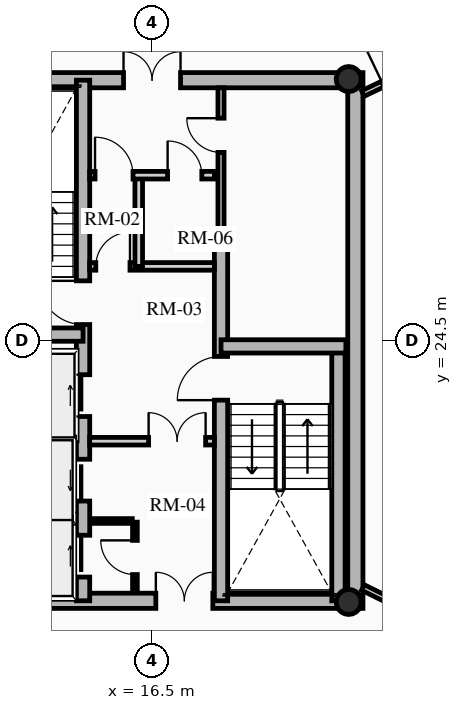
"""IFC4 building model, lengths in metres.
Left out: names, types, materials, properties, quantities, classifications, styles, units other than length and angle.
Written with IfcOpenShell. Run it as: python <this file> out.ifc"""

import sys

from ifc_helpers import new_model, si_unit, direction, frame, frame_2d, origin, origin_2d, place, context, subcontext, project, spatial, rectangle, hollow_circle, extrude, source, transform, mapped, element, fill, save


model = new_model("IFC4")
c1 = context("Model", 3, precision=1e-05, world=origin(), true_north=direction((0.0, 1.0)))
c2 = subcontext(c1, "Body", "Model", "MODEL_VIEW")
j1 = project(units=[si_unit("LENGTHUNIT", "METRE"), si_unit("PLANEANGLEUNIT", "RADIAN")], contexts=[c1])
p1 = place(None, origin())
s1 = spatial("IfcSite", under=j1, at=p1, CompositionType="ELEMENT")
p2 = place(p1, origin())
s2 = spatial("IfcBuilding", under=s1, at=p2, CompositionType="ELEMENT")
p3 = place(p2, frame((0.0, 0.0, 199.57)))
s3 = spatial("IfcBuildingStorey", under=s2, at=p3, CompositionType="ELEMENT", Elevation=199.57)
p4 = place(p3, frame((21.85, 17.45, 0.0), z_axis=(0.0, 0.0, 1.0), x_axis=(0.0, 1.0, 0.0)))
e1 = element("IfcWall", 1, at=p4, inside=s3, PredefinedType="SHEAR", context=c2, shape_type="SweptSolid", body=[
    extrude(rectangle(XDim=14.1, YDim=0.4, at=frame_2d((7.05, 0.0))), origin(), (0.0, 0.0, 1.0), 2.91),
])
p5 = place(p3, frame((11.15, 17.65, 0.0), z_axis=(0.0, 0.0, 1.0), x_axis=(1.0, 0.0, 0.0)))
e2 = element("IfcWall", 2, at=p5, inside=s3, PredefinedType="SHEAR", context=c2, shape_type="SweptSolid", body=[
    extrude(rectangle(XDim=10.7, YDim=0.4, at=frame_2d((5.35, 0.0))), origin(), (0.0, 0.0, 1.0), 2.91),
])
m1 = source(origin(), c2, "Body", "SweptSolid", [
    extrude(rectangle(XDim=1.5, YDim=2.02, at=frame_2d((0.75, 1.01))), frame((0.0, 0.21, 0.0), z_axis=(0.0, -1.0, 0.0), x_axis=(1.0, 0.0, 0.0)), (0.0, 0.0, 1.0), 0.42),
])
p6 = place(p5, frame((5.45, 0.0, 0.0)))
e3 = element("IfcOpeningElement", 3, at=p6, cuts=e2, PredefinedType="OPENING", context=c2, shape_type="MappedRepresentation", body=[
    mapped(m1, transform((0.0, 0.0, 0.0), x_axis=(1.0, 0.0, 0.0), y_axis=(0.0, 1.0, 0.0), z_axis=(0.0, 0.0, 1.0), scale=1.0)),
])
p7 = place(p3, frame((11.15, 31.35, 0.0), z_axis=(0.0, 0.0, 1.0), x_axis=(1.0, 0.0, 0.0)))
e4 = element("IfcWall", 4, at=p7, inside=s3, PredefinedType="SHEAR", context=c2, shape_type="SweptSolid", body=[
    extrude(rectangle(XDim=10.7, YDim=0.4, at=frame_2d((5.35, 0.0))), origin(), (0.0, 0.0, 1.0), 2.91),
])
p8 = place(p7, frame((4.6, 0.0, 0.0)))
e5 = element("IfcOpeningElement", 5, at=p8, cuts=e4, PredefinedType="OPENING", context=c2, shape_type="MappedRepresentation", body=[
    mapped(m1, transform((0.0, 0.0, 0.0), x_axis=(1.0, 0.0, 0.0), y_axis=(0.0, 1.0, 0.0), z_axis=(0.0, 0.0, 1.0), scale=1.0)),
])
p9 = place(p3, frame((14.685, 17.65, 0.0), z_axis=(0.0, 0.0, 1.0), x_axis=(0.0, 1.0, 0.0)))
e6 = element("IfcWall", 6, at=p9, inside=s3, PredefinedType="SHEAR", context=c2, shape_type="SweptSolid", body=[
    extrude(rectangle(XDim=13.7, YDim=0.35, at=frame_2d((6.85, 0.0))), origin(), (0.0, 0.0, 1.0), 2.91),
])
m2 = source(origin(), c2, "Body", "SweptSolid", [
    extrude(rectangle(XDim=1.1, YDim=2.015, at=frame_2d((0.55, 1.007))), frame((0.0, 0.185, 0.0), z_axis=(0.0, -1.0, 0.0), x_axis=(1.0, 0.0, 0.0)), (0.0, 0.0, 1.0), 0.37),
])
p10 = place(p9, frame((4.85, 0.0, 0.0)))
e7 = element("IfcOpeningElement", 7, at=p10, cuts=e6, PredefinedType="OPENING", context=c2, shape_type="MappedRepresentation", body=[
    mapped(m2, transform((0.0, 0.0, 0.0), x_axis=(1.0, 0.0, 0.0), y_axis=(0.0, 1.0, 0.0), z_axis=(0.0, 0.0, 1.0), scale=1.0)),
])
p11 = place(p9, frame((0.625, 0.0, 0.0)))
e8 = element("IfcOpeningElement", 8, at=p11, cuts=e6, PredefinedType="OPENING", context=c2, shape_type="MappedRepresentation", body=[
    mapped(m2, transform((0.0, 0.0, 0.0), x_axis=(1.0, 0.0, 0.0), y_axis=(0.0, 1.0, 0.0), z_axis=(0.0, 0.0, 1.0), scale=1.0)),
])
p12 = place(p9, frame((2.625, 0.0, 0.0)))
e9 = element("IfcOpeningElement", 9, at=p12, cuts=e6, PredefinedType="OPENING", context=c2, shape_type="MappedRepresentation", body=[
    mapped(m2, transform((0.0, 0.0, 0.0), x_axis=(1.0, 0.0, 0.0), y_axis=(0.0, 1.0, 0.0), z_axis=(0.0, 0.0, 1.0), scale=1.0)),
])
m3 = source(origin(), c2, "Body", "SweptSolid", [
    extrude(rectangle(XDim=1.15, YDim=2.02, at=frame_2d((0.575, 1.01))), frame((0.0, 0.185, 0.0), z_axis=(0.0, -1.0, 0.0), x_axis=(1.0, 0.0, 0.0)), (0.0, 0.0, 1.0), 0.37),
])
p13 = place(p9, frame((7.27, 0.0, 0.0)))
e10 = element("IfcOpeningElement", 10, at=p13, cuts=e6, PredefinedType="OPENING", context=c2, shape_type="MappedRepresentation", body=[
    mapped(m3, transform((0.0, 0.0, 0.0), x_axis=(1.0, 0.0, 0.0), y_axis=(0.0, 1.0, 0.0), z_axis=(0.0, 0.0, 1.0), scale=1.0)),
])
p14 = place(p3, frame((18.315, 17.65, 0.0), z_axis=(0.0, 0.0, 1.0), x_axis=(0.0, 1.0, 0.0)))
e11 = element("IfcWall", 11, at=p14, inside=s3, PredefinedType="SHEAR", context=c2, shape_type="SweptSolid", body=[
    extrude(rectangle(XDim=9.6, YDim=0.35, at=frame_2d((4.8, 0.0))), origin(), (0.0, 0.0, 1.0), 2.91),
])
p15 = place(p14, frame((5.28, 0.0, 0.0)))
e12 = element("IfcOpeningElement", 12, at=p15, cuts=e11, PredefinedType="OPENING", context=c2, shape_type="MappedRepresentation", body=[
    mapped(m3, transform((0.0, 0.0, 0.0), x_axis=(1.0, 0.0, 0.0), y_axis=(0.0, 1.0, 0.0), z_axis=(0.0, 0.0, 1.0), scale=1.0)),
])
p16 = place(p3, frame((11.4, 24.655, 0.0), z_axis=(0.0, 0.0, 1.0), x_axis=(1.0, 0.0, 0.0)))
e13 = element("IfcWall", 13, at=p16, inside=s3, PredefinedType="SHEAR", context=c2, shape_type="SweptSolid", body=[
    extrude(rectangle(XDim=3.285, YDim=0.35, at=frame_2d((1.643, 0.0))), origin(), (0.0, 0.0, 1.0), 2.91),
])
p17 = place(p3, frame((21.405, 17.65, 0.0), z_axis=(0.0, 0.0, 1.0), x_axis=(0.0, 1.0, 0.0)))
e14 = element("IfcWall", 14, at=p17, inside=s3, PredefinedType="SHEAR", context=c2, shape_type="SweptSolid", body=[
    extrude(rectangle(XDim=6.695, YDim=0.35, at=frame_2d((3.348, 0.0))), origin(), (0.0, 0.0, 1.0), 2.91),
])
p18 = place(p3, frame((18.315, 24.345, 0.0), z_axis=(0.0, 0.0, 1.0), x_axis=(1.0, 0.0, 0.0)))
e15 = element("IfcWall", 15, at=p18, inside=s3, PredefinedType="SHEAR", context=c2, shape_type="SweptSolid", body=[
    extrude(rectangle(XDim=3.285, YDim=0.35, at=frame_2d((1.643, 0.0))), origin(), (0.0, 0.0, 1.0), 2.91),
])
for number, where, z_axis, x_axis in (
    (16, (21.675, 17.62, 0.0), (0.0, 0.0, 1.0), (1.0, 0.0, 0.0)),
    (17, (21.675, 31.38, 0.0), (0.0, 0.0, 1.0), (1.0, 0.0, 0.0)),
):
    element("IfcColumn", number, at=place(p3, frame(where, z_axis=z_axis, x_axis=x_axis)), inside=s3, PredefinedType="COLUMN", context=c2, shape_type="SweptSolid", body=[
        extrude(hollow_circle(Radius=0.33, WallThickness=0.025, at=origin_2d()), origin(), (0.0, 0.0, 1.0), 2.91),
    ])
for number, where, z_axis, x_axis in (
    (18, (11.52, 21.8, 0.0), (0.0, 0.0, 1.0), (1.0, 0.0, 0.0)),
    (19, (11.52, 19.825, 0.0), (0.0, 0.0, 1.0), (1.0, 0.0, 0.0)),
):
    element("IfcWall", number, at=place(p3, frame(where, z_axis=z_axis, x_axis=x_axis)), inside=s3, PredefinedType="SHEAR", context=c2, shape_type="SweptSolid", body=[
        extrude(rectangle(XDim=2.97, YDim=0.2, at=frame_2d((1.485, 0.0))), origin(), (0.0, 0.0, 1.0), 2.91),
    ])
p19 = place(p3, frame((14.86, 21.85, 0.0), z_axis=(0.0, 0.0, 1.0), x_axis=(1.0, 0.0, 0.0)))
e20 = element("IfcWall", 20, at=p19, inside=s3, PredefinedType="PARTITIONING", context=c2, shape_type="SweptSolid", body=[
    extrude(rectangle(XDim=3.28, YDim=0.2, at=frame_2d((1.64, 0.0))), origin(), (0.0, 0.0, 1.0), 2.685),
])
m4 = source(origin(), c2, "Body", "SweptSolid", [
    extrude(rectangle(XDim=1.5, YDim=2.02, at=frame_2d((0.75, 1.01))), frame((0.0, 0.11, 0.0), z_axis=(0.0, -1.0, 0.0), x_axis=(1.0, 0.0, 0.0)), (0.0, 0.0, 1.0), 0.22),
])
p20 = place(p19, frame((1.55, 0.0, 0.0)))
e21 = element("IfcOpeningElement", 21, at=p20, cuts=e20, PredefinedType="OPENING", context=c2, shape_type="MappedRepresentation", body=[
    mapped(m4, transform((0.0, 0.0, 0.0), x_axis=(1.0, 0.0, 0.0), y_axis=(0.0, 1.0, 0.0), z_axis=(0.0, 0.0, 1.0), scale=1.0)),
])
p21 = place(p3, frame((14.86, 26.45, 0.0), z_axis=(0.0, 0.0, 1.0), x_axis=(1.0, 0.0, 0.0)))
e22 = element("IfcWall", 22, at=p21, inside=s3, PredefinedType="PARTITIONING", context=c2, shape_type="SweptSolid", body=[
    extrude(rectangle(XDim=3.28, YDim=0.2, at=frame_2d((1.64, 0.0))), origin(), (0.0, 0.0, 1.0), 2.685),
])
m5 = source(origin(), c2, "Body", "SweptSolid", [
    extrude(rectangle(XDim=0.9, YDim=2.005, at=frame_2d((0.45, 1.002))), frame((0.0, 0.11, 0.0), z_axis=(0.0, -1.0, 0.0), x_axis=(1.0, 0.0, 0.0)), (0.0, 0.0, 1.0), 0.22),
])
p22 = place(p21, frame((0.16, 0.0, 0.0)))
e23 = element("IfcOpeningElement", 23, at=p22, cuts=e22, PredefinedType="OPENING", context=c2, shape_type="MappedRepresentation", body=[
    mapped(m5, transform((0.0, 0.0, 0.0), x_axis=(1.0, 0.0, 0.0), y_axis=(0.0, 1.0, 0.0), z_axis=(0.0, 0.0, 1.0), scale=1.0)),
])
p23 = place(p3, frame((16.15, 26.45, 0.0), z_axis=(0.0, 0.0, 1.0), x_axis=(0.0, 1.0, 0.0)))
e24 = element("IfcWall", 24, at=p23, inside=s3, PredefinedType="PARTITIONING", context=c2, shape_type="SweptSolid", body=[
    extrude(rectangle(XDim=2.4, YDim=0.2, at=frame_2d((1.2, 0.0))), origin(), (0.0, 0.0, 1.0), 2.685),
])
p24 = place(p3, frame((14.86, 28.85, 0.0), z_axis=(0.0, 0.0, 1.0), x_axis=(1.0, 0.0, 0.0)))
e25 = element("IfcWall", 25, at=p24, inside=s3, PredefinedType="PARTITIONING", context=c2, shape_type="SweptSolid", body=[
    extrude(rectangle(XDim=3.28, YDim=0.2, at=frame_2d((1.64, 0.0))), origin(), (0.0, 0.0, 1.0), 2.685),
])
m6 = source(origin(), c2, "Body", "SweptSolid", [
    extrude(rectangle(XDim=1.0, YDim=2.015, at=frame_2d((0.5, 1.007))), frame((0.0, 0.11, 0.0), z_axis=(0.0, -1.0, 0.0), x_axis=(1.0, 0.0, 0.0)), (0.0, 0.0, 1.0), 0.22),
])
p25 = place(p24, frame((0.14, 0.0, 0.0)))
e26 = element("IfcOpeningElement", 26, at=p25, cuts=e25, PredefinedType="OPENING", context=c2, shape_type="MappedRepresentation", body=[
    mapped(m6, transform((0.0, 0.0, 0.0), x_axis=(1.0, 0.0, 0.0), y_axis=(0.0, 1.0, 0.0), z_axis=(0.0, 0.0, 1.0), scale=1.0)),
])
p26 = place(p24, frame((2.05, 0.0, 0.0)))
e27 = element("IfcOpeningElement", 27, at=p26, cuts=e25, PredefinedType="OPENING", context=c2, shape_type="MappedRepresentation", body=[
    mapped(m5, transform((0.0, 0.0, 0.0), x_axis=(1.0, 0.0, 0.0), y_axis=(0.0, 1.0, 0.0), z_axis=(0.0, 0.0, 1.0), scale=1.0)),
])
p27 = place(p3, frame((16.05, 17.92, 0.0), z_axis=(0.0, 0.0, 1.0), x_axis=(0.0, 1.0, 0.0)))
e28 = element("IfcWall", 28, at=p27, inside=s3, PredefinedType="PARTITIONING", context=c2, shape_type="SweptSolid", body=[
    extrude(rectangle(XDim=1.8, YDim=0.125, at=frame_2d((0.9, 0.0))), origin(), (0.0, 0.0, 1.0), 2.685),
])
m7 = source(origin(), c2, "Body", "SweptSolid", [
    extrude(rectangle(XDim=0.9, YDim=2.005, at=frame_2d((0.45, 1.002))), frame((0.0, 0.073, 0.0), z_axis=(0.0, -1.0, 0.0), x_axis=(1.0, 0.0, 0.0)), (0.0, 0.0, 1.0), 0.145),
])
p28 = place(p27, frame((0.42, 0.0, 0.0)))
e29 = element("IfcOpeningElement", 29, at=p28, cuts=e28, PredefinedType="OPENING", context=c2, shape_type="MappedRepresentation", body=[
    mapped(m7, transform((0.0, 0.0, 0.0), x_axis=(1.0, 0.0, 0.0), y_axis=(0.0, 1.0, 0.0), z_axis=(0.0, 0.0, 1.0), scale=1.0)),
])
p29 = place(p3, frame((14.88, 19.75, 0.0), z_axis=(0.0, 0.0, 1.0), x_axis=(1.0, 0.0, 0.0)))
e30 = element("IfcWall", 30, at=p29, inside=s3, PredefinedType="PARTITIONING", context=c2, shape_type="SweptSolid", body=[
    extrude(rectangle(XDim=1.1, YDim=0.125, at=frame_2d((0.55, 0.0))), origin(), (0.0, 0.0, 1.0), 2.685),
])
p30 = place(p3, frame((18.315, 27.25, 0.0), z_axis=(0.0, 0.0, 1.0), x_axis=(0.0, 1.0, 0.0)))
e31 = element("IfcWall", 31, at=p30, inside=s3, PredefinedType="PARTITIONING", context=c2, shape_type="SweptSolid", body=[
    extrude(rectangle(XDim=3.9, YDim=0.16, at=frame_2d((1.95, 0.0))), origin(), (0.0, 0.0, 1.0), 2.685),
])
m8 = source(origin(), c2, "Body", "SweptSolid", [
    extrude(rectangle(XDim=0.9, YDim=2.005, at=frame_2d((0.45, 1.002))), frame((0.0, 0.09, 0.0), z_axis=(0.0, -1.0, 0.0), x_axis=(1.0, 0.0, 0.0)), (0.0, 0.0, 1.0), 0.18),
])
p31 = place(p30, frame((2.2, 0.0, 0.0)))
e32 = element("IfcOpeningElement", 32, at=p31, cuts=e31, PredefinedType="OPENING", context=c2, shape_type="MappedRepresentation", body=[
    mapped(m8, transform((0.0, 0.0, 0.0), x_axis=(1.0, 0.0, 0.0), y_axis=(0.0, 1.0, 0.0), z_axis=(0.0, 0.0, 1.0), scale=1.0)),
])
p32 = place(p3, frame((22.05, 31.0, 0.0), z_axis=(0.0, 0.0, 1.0), x_axis=(0.903013459407, 0.429612257891, 0.0)))
e33 = element("IfcWall", 33, at=p32, inside=s3, PredefinedType="PARTITIONING", context=c2, shape_type="SweptSolid", body=[
    extrude(rectangle(XDim=1.829, YDim=0.16, at=frame_2d((0.914, 0.0))), origin(), (0.0, 0.0, 1.0), 2.255),
])
m9 = source(origin(), c2, "Body", "SweptSolid", [
    extrude(rectangle(XDim=1.05, YDim=2.015, at=frame_2d((0.525, 1.007))), frame((0.0, 0.09, 0.0), z_axis=(0.0, -1.0, 0.0), x_axis=(1.0, 0.0, 0.0)), (0.0, 0.0, 1.0), 0.18),
])
p33 = place(p32, frame((0.579, 0.0, 0.0)))
e34 = element("IfcOpeningElement", 34, at=p33, cuts=e33, PredefinedType="OPENING", context=c2, shape_type="MappedRepresentation", body=[
    mapped(m9, transform((0.0, 0.0, 0.0), x_axis=(1.0, 0.0, 0.0), y_axis=(0.0, 1.0, 0.0), z_axis=(0.0, 0.0, 1.0), scale=1.0)),
])
p34 = place(p3, frame((22.05, 18.0, 0.0), z_axis=(0.0, 0.0, 1.0), x_axis=(0.896045848613, -0.443961526692, 0.0)))
e35 = element("IfcWall", 35, at=p34, inside=s3, PredefinedType="PARTITIONING", context=c2, shape_type="SweptSolid", body=[
    extrude(rectangle(XDim=1.924, YDim=0.16, at=frame_2d((0.962, 0.0))), origin(), (0.0, 0.0, 1.0), 2.255),
])
p35 = place(p34, frame((0.674, 0.0, 0.0)))
e36 = element("IfcOpeningElement", 36, at=p35, cuts=e35, PredefinedType="OPENING", context=c2, shape_type="MappedRepresentation", body=[
    mapped(m9, transform((0.0, 0.0, 0.0), x_axis=(1.0, 0.0, 0.0), y_axis=(0.0, 1.0, 0.0), z_axis=(0.0, 0.0, 1.0), scale=1.0)),
])
m10 = source(origin(), c2, "Body", "SweptSolid", [
    extrude(rectangle(XDim=1.1, YDim=2.015, at=frame_2d((0.55, 1.007))), frame((0.0, 0.025, 0.0), z_axis=(0.0, -1.0, 0.0), x_axis=(1.0, 0.0, 0.0)), (0.0, 0.0, 1.0), 0.05),
])
p36 = place(p10, origin())
e37 = element("IfcDoor", 37, at=p36, inside=s3, OperationType="SLIDING_TO_RIGHT", PredefinedType="DOOR", context=c2, shape_type="MappedRepresentation", body=[
    mapped(m10, transform((0.0, 0.0, 0.0), x_axis=(1.0, 0.0, 0.0), y_axis=(0.0, 1.0, 0.0), z_axis=(0.0, 0.0, 1.0), scale=1.0)),
])
fill(e7, e37)
p37 = place(p11, origin())
e38 = element("IfcDoor", 38, at=p37, inside=s3, OperationType="SLIDING_TO_RIGHT", PredefinedType="DOOR", context=c2, shape_type="MappedRepresentation", body=[
    mapped(m10, transform((0.0, 0.0, 0.0), x_axis=(1.0, 0.0, 0.0), y_axis=(0.0, 1.0, 0.0), z_axis=(0.0, 0.0, 1.0), scale=1.0)),
])
fill(e8, e38)
p38 = place(p12, origin())
e39 = element("IfcDoor", 39, at=p38, inside=s3, OperationType="SLIDING_TO_LEFT", PredefinedType="DOOR", context=c2, shape_type="MappedRepresentation", body=[
    mapped(m10, transform((0.0, 0.0, 0.0), x_axis=(1.0, 0.0, 0.0), y_axis=(0.0, 1.0, 0.0), z_axis=(0.0, 0.0, 1.0), scale=1.0)),
])
fill(e9, e39)
m11 = source(origin(), c2, "Body", "SweptSolid", [
    extrude(rectangle(XDim=1.15, YDim=2.02, at=frame_2d((0.575, 1.01))), frame((0.0, 0.025, 0.0), z_axis=(0.0, -1.0, 0.0), x_axis=(1.0, 0.0, 0.0)), (0.0, 0.0, 1.0), 0.05),
])
p39 = place(p13, origin())
e40 = element("IfcDoor", 40, at=p39, inside=s3, OperationType="SINGLE_SWING_RIGHT", PredefinedType="DOOR", context=c2, shape_type="MappedRepresentation", body=[
    mapped(m11, transform((0.0, 0.0, 0.0), x_axis=(1.0, 0.0, 0.0), y_axis=(0.0, 1.0, 0.0), z_axis=(0.0, 0.0, 1.0), scale=1.0)),
])
fill(e10, e40)
p40 = place(p15, origin())
e41 = element("IfcDoor", 41, at=p40, inside=s3, OperationType="SINGLE_SWING_LEFT", PredefinedType="DOOR", context=c2, shape_type="MappedRepresentation", body=[
    mapped(m11, transform((0.0, 0.0, 0.0), x_axis=(1.0, 0.0, 0.0), y_axis=(0.0, 1.0, 0.0), z_axis=(0.0, 0.0, 1.0), scale=1.0)),
])
fill(e12, e41)
m12 = source(origin(), c2, "Body", "SweptSolid", [
    extrude(rectangle(XDim=1.5, YDim=2.02, at=frame_2d((0.75, 1.01))), frame((0.0, 0.025, 0.0), z_axis=(0.0, -1.0, 0.0), x_axis=(1.0, 0.0, 0.0)), (0.0, 0.0, 1.0), 0.05),
])
p41 = place(p8, origin())
e42 = element("IfcDoor", 42, at=p41, inside=s3, OperationType="DOUBLE_DOOR_SINGLE_SWING", PredefinedType="DOOR", context=c2, shape_type="MappedRepresentation", body=[
    mapped(m12, transform((0.0, 0.0, 0.0), x_axis=(1.0, 0.0, 0.0), y_axis=(0.0, 1.0, 0.0), z_axis=(0.0, 0.0, 1.0), scale=1.0)),
])
fill(e5, e42)
p42 = place(p6, origin())
e43 = element("IfcDoor", 43, at=p42, inside=s3, OperationType="DOUBLE_DOOR_SINGLE_SWING", PredefinedType="DOOR", context=c2, shape_type="MappedRepresentation", body=[
    mapped(m12, transform((0.0, 0.0, 0.0), x_axis=(1.0, 0.0, 0.0), y_axis=(0.0, 1.0, 0.0), z_axis=(0.0, 0.0, 1.0), scale=1.0)),
])
fill(e3, e43)
p43 = place(p20, origin())
e44 = element("IfcDoor", 44, at=p43, inside=s3, OperationType="DOUBLE_DOOR_SINGLE_SWING", PredefinedType="DOOR", context=c2, shape_type="MappedRepresentation", body=[
    mapped(m12, transform((0.0, 0.0, 0.0), x_axis=(1.0, 0.0, 0.0), y_axis=(0.0, 1.0, 0.0), z_axis=(0.0, 0.0, 1.0), scale=1.0)),
])
fill(e21, e44)
m13 = source(origin(), c2, "Body", "SweptSolid", [
    extrude(rectangle(XDim=0.9, YDim=2.005, at=frame_2d((0.45, 1.002))), frame((0.0, 0.025, 0.0), z_axis=(0.0, -1.0, 0.0), x_axis=(1.0, 0.0, 0.0)), (0.0, 0.0, 1.0), 0.05),
])
p44 = place(p22, origin())
e45 = element("IfcDoor", 45, at=p44, inside=s3, OperationType="SINGLE_SWING_RIGHT", PredefinedType="DOOR", context=c2, shape_type="MappedRepresentation", body=[
    mapped(m13, transform((0.0, 0.0, 0.0), x_axis=(1.0, 0.0, 0.0), y_axis=(0.0, 1.0, 0.0), z_axis=(0.0, 0.0, 1.0), scale=1.0)),
])
fill(e23, e45)
m14 = source(origin(), c2, "Body", "SweptSolid", [
    extrude(rectangle(XDim=1.0, YDim=2.015, at=frame_2d((0.5, 1.007))), frame((0.0, 0.025, 0.0), z_axis=(0.0, -1.0, 0.0), x_axis=(1.0, 0.0, 0.0)), (0.0, 0.0, 1.0), 0.05),
])
p45 = place(p25, origin())
e46 = element("IfcDoor", 46, at=p45, inside=s3, OperationType="SINGLE_SWING_LEFT", PredefinedType="DOOR", context=c2, shape_type="MappedRepresentation", body=[
    mapped(m14, transform((0.0, 0.0, 0.0), x_axis=(1.0, 0.0, 0.0), y_axis=(0.0, 1.0, 0.0), z_axis=(0.0, 0.0, 1.0), scale=1.0)),
])
fill(e26, e46)
p46 = place(p28, origin())
e47 = element("IfcDoor", 47, at=p46, inside=s3, OperationType="SINGLE_SWING_RIGHT", PredefinedType="DOOR", context=c2, shape_type="MappedRepresentation", body=[
    mapped(m13, transform((0.0, 0.0, 0.0), x_axis=(1.0, 0.0, 0.0), y_axis=(0.0, 1.0, 0.0), z_axis=(0.0, 0.0, 1.0), scale=1.0)),
])
fill(e29, e47)
p47 = place(p26, origin())
e48 = element("IfcDoor", 48, at=p47, inside=s3, OperationType="SINGLE_SWING_LEFT", PredefinedType="DOOR", context=c2, shape_type="MappedRepresentation", body=[
    mapped(m13, transform((0.0, 0.0, 0.0), x_axis=(1.0, 0.0, 0.0), y_axis=(0.0, 1.0, 0.0), z_axis=(0.0, 0.0, 1.0), scale=1.0)),
])
fill(e27, e48)
p48 = place(p31, origin())
e49 = element("IfcDoor", 49, at=p48, inside=s3, OperationType="SINGLE_SWING_RIGHT", PredefinedType="DOOR", context=c2, shape_type="MappedRepresentation", body=[
    mapped(m13, transform((0.0, 0.0, 0.0), x_axis=(1.0, 0.0, 0.0), y_axis=(0.0, 1.0, 0.0), z_axis=(0.0, 0.0, 1.0), scale=1.0)),
])
fill(e32, e49)
save(model, sys.argv[1])
